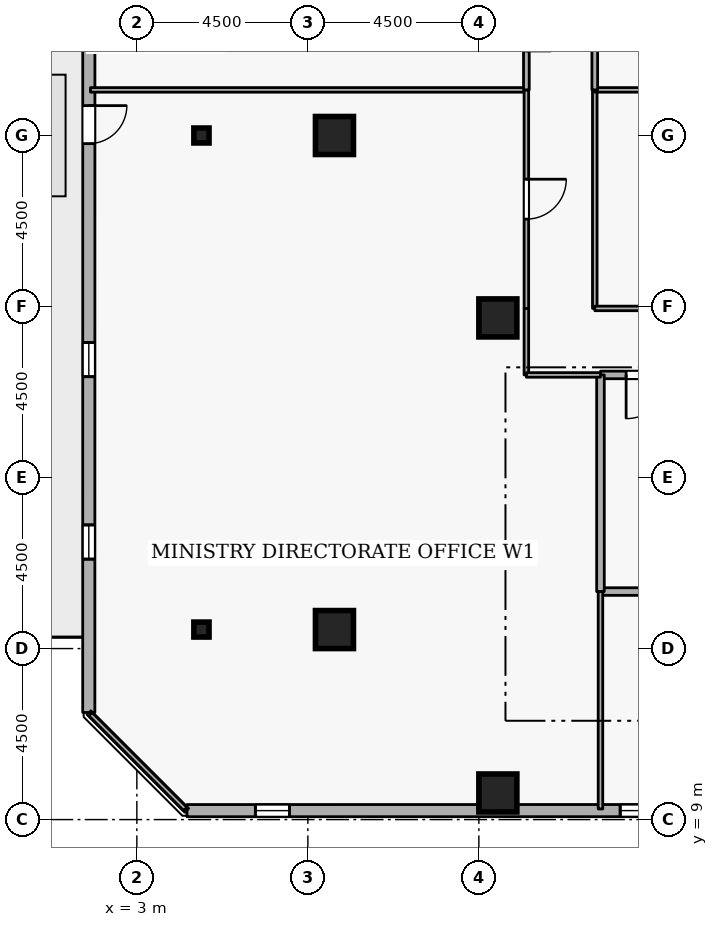
"""IFC4 building model, lengths in metres.
Left out: names, types, materials, properties, quantities, classifications, styles, units other than length and angle.
Written with IfcOpenShell. Run it as: python <this file> out.ifc"""

import sys

from ifc_helpers import new_model, si_unit, direction, frame, frame_2d, origin, origin_2d, place, context, subcontext, project, spatial, rectangle, i_section, extrude, element, fill, save


model = new_model("IFC4")
c1 = context("Model", 3, precision=1e-05, world=origin(), true_north=direction((0.0, 1.0)))
c2 = subcontext(c1, "Body", "Model", "MODEL_VIEW")
j1 = project(units=[si_unit("LENGTHUNIT", "METRE"), si_unit("PLANEANGLEUNIT", "RADIAN")], contexts=[c1])
p1 = place(None, origin())
s1 = spatial("IfcSite", under=j1, at=p1, CompositionType="ELEMENT")
p2 = place(p1, origin())
s2 = spatial("IfcBuilding", under=s1, at=p2, CompositionType="ELEMENT")
p3 = place(p2, frame((0.0, 0.0, 210.9)))
s3 = spatial("IfcBuildingStorey", under=s2, at=p3, CompositionType="ELEMENT", Elevation=210.9)
for number, where, z_axis, x_axis in (
    (1, (12.5, 9.7, 0.0), (0.0, 0.0, 1.0), (1.0, 0.0, 0.0)),
    (2, (8.2, 14.0, 0.0), (0.0, 0.0, 1.0), (1.0, 0.0, 0.0)),
    (3, (8.2, 27.0, 0.0), (0.0, 0.0, 1.0), (1.0, 0.0, 0.0)),
    (4, (12.5, 22.2, 0.0), (0.0, 0.0, 1.0), (1.0, 0.0, 0.0)),
):
    element("IfcColumn", number, at=place(p3, frame(where, z_axis=z_axis, x_axis=x_axis)), inside=s3, PredefinedType="COLUMN", context=c2, shape_type="SweptSolid", body=[
        extrude(rectangle(XDim=1.0, YDim=1.0, at=origin_2d()), origin(), (0.0, 0.0, 1.0), 3.6),
    ])
for number, where, z_axis, x_axis in (
    (5, (4.7, 14.0, 0.0), (0.0, 0.0, 1.0), (1.0, 0.0, 0.0)),
    (6, (4.7, 27.0, 0.0), (0.0, 0.0, 1.0), (1.0, 0.0, 0.0)),
):
    element("IfcColumn", number, at=place(p3, frame(where, z_axis=z_axis, x_axis=x_axis)), inside=s3, PredefinedType="COLUMN", context=c2, shape_type="SweptSolid", body=[
        extrude(i_section(OverallWidth=0.399, OverallDepth=0.394, WebThickness=0.023, FlangeThickness=0.037, FilletRadius=0.015, at=origin_2d()), origin(), (0.0, 0.0, 1.0), 3.6),
    ])
p4 = place(p3, frame((4.319, 9.235, 0.0), z_axis=(0.0, 0.0, 1.0), x_axis=(0.999999997144, 7.5574884e-05, 0.0)))
e7 = element("IfcWall", 7, at=p4, inside=s3, PredefinedType="STANDARD", context=c2, shape_type="SweptSolid", body=[
    extrude(rectangle(XDim=35.535, YDim=0.32, at=frame_2d((17.768, 0.0))), origin(), (0.0, 0.0, 1.0), 2.7),
])
p5 = place(p4, frame((1.8, 0.0, 0.72)))
e8 = element("IfcOpeningElement", 8, at=p5, cuts=e7, PredefinedType="OPENING", context=c2, shape_type="SweptSolid", body=[
    extrude(rectangle(XDim=0.9, YDim=1.75, at=frame_2d((0.45, 0.875))), frame((0.0, 0.17, 0.0), z_axis=(0.0, -1.0, 0.0), x_axis=(1.0, 0.0, 0.0)), (0.0, 0.0, 1.0), 0.34),
])
p6 = place(p4, frame((11.4, 0.0, 0.72)))
e9 = element("IfcOpeningElement", 9, at=p6, cuts=e7, PredefinedType="OPENING", context=c2, shape_type="SweptSolid", body=[
    extrude(rectangle(XDim=0.9, YDim=1.75, at=frame_2d((0.45, 0.875))), frame((0.0, 0.17, 0.0), z_axis=(0.0, -1.0, 0.0), x_axis=(1.0, 0.0, 0.0)), (0.0, 0.0, 1.0), 0.34),
])
p7 = place(p4, frame((16.2, 0.0, 0.72)))
e10 = element("IfcOpeningElement", 10, at=p7, cuts=e7, PredefinedType="OPENING", context=c2, shape_type="SweptSolid", body=[
    extrude(rectangle(XDim=0.9, YDim=1.75, at=frame_2d((0.45, 0.875))), frame((0.0, 0.17, 0.0), z_axis=(0.0, -1.0, 0.0), x_axis=(1.0, 0.0, 0.0)), (0.0, 0.0, 1.0), 0.34),
])
p8 = place(p4, frame((25.8, 0.0, 0.72)))
e11 = element("IfcOpeningElement", 11, at=p8, cuts=e7, PredefinedType="OPENING", context=c2, shape_type="SweptSolid", body=[
    extrude(rectangle(XDim=0.9, YDim=1.75, at=frame_2d((0.45, 0.875))), frame((0.0, 0.17, 0.0), z_axis=(0.0, -1.0, 0.0), x_axis=(1.0, 0.0, 0.0)), (0.0, 0.0, 1.0), 0.34),
])
p9 = place(p3, frame((1.738, 47.354, 0.0), z_axis=(0.0, 0.0, 1.0), x_axis=(-7.5574884e-05, -0.999999997144, 0.0)))
e12 = element("IfcWall", 12, at=p9, inside=s3, PredefinedType="STANDARD", context=c2, shape_type="SweptSolid", body=[
    extrude(rectangle(XDim=35.535, YDim=0.32, at=frame_2d((17.768, 0.0))), origin(), (0.0, 0.0, 1.0), 2.7),
])
p10 = place(p9, frame((19.567, 0.0, 0.0)))
e13 = element("IfcOpeningElement", 13, at=p10, cuts=e12, PredefinedType="OPENING", context=c2, shape_type="SweptSolid", body=[
    extrude(rectangle(XDim=1.0, YDim=2.08, at=frame_2d((0.5, 1.04))), frame((0.0, 0.17, 0.0), z_axis=(0.0, -1.0, 0.0), x_axis=(1.0, 0.0, 0.0)), (0.0, 0.0, 1.0), 0.34),
])
p11 = place(p9, frame((1.8, 0.0, 0.72)))
e14 = element("IfcOpeningElement", 14, at=p11, cuts=e12, PredefinedType="OPENING", context=c2, shape_type="SweptSolid", body=[
    extrude(rectangle(XDim=0.9, YDim=1.75, at=frame_2d((0.45, 0.875))), frame((0.0, 0.17, 0.0), z_axis=(0.0, -1.0, 0.0), x_axis=(1.0, 0.0, 0.0)), (0.0, 0.0, 1.0), 0.34),
])
p12 = place(p9, frame((6.6, 0.0, 0.72)))
e15 = element("IfcOpeningElement", 15, at=p12, cuts=e12, PredefinedType="OPENING", context=c2, shape_type="SweptSolid", body=[
    extrude(rectangle(XDim=0.9, YDim=1.75, at=frame_2d((0.45, 0.875))), frame((0.0, 0.17, 0.0), z_axis=(0.0, -1.0, 0.0), x_axis=(1.0, 0.0, 0.0)), (0.0, 0.0, 1.0), 0.34),
])
p13 = place(p9, frame((11.4, 0.0, 0.72)))
e16 = element("IfcOpeningElement", 16, at=p13, cuts=e12, PredefinedType="OPENING", context=c2, shape_type="SweptSolid", body=[
    extrude(rectangle(XDim=0.9, YDim=1.75, at=frame_2d((0.45, 0.875))), frame((0.0, 0.17, 0.0), z_axis=(0.0, -1.0, 0.0), x_axis=(1.0, 0.0, 0.0)), (0.0, 0.0, 1.0), 0.34),
])
p14 = place(p9, frame((16.2, 0.0, 0.72)))
e17 = element("IfcOpeningElement", 17, at=p14, cuts=e12, PredefinedType="OPENING", context=c2, shape_type="SweptSolid", body=[
    extrude(rectangle(XDim=0.9, YDim=1.75, at=frame_2d((0.45, 0.875))), frame((0.0, 0.17, 0.0), z_axis=(0.0, -1.0, 0.0), x_axis=(1.0, 0.0, 0.0)), (0.0, 0.0, 1.0), 0.34),
])
p15 = place(p9, frame((25.8, 0.0, 0.72)))
e18 = element("IfcOpeningElement", 18, at=p15, cuts=e12, PredefinedType="OPENING", context=c2, shape_type="SweptSolid", body=[
    extrude(rectangle(XDim=0.9, YDim=1.75, at=frame_2d((0.45, 0.875))), frame((0.0, 0.17, 0.0), z_axis=(0.0, -1.0, 0.0), x_axis=(1.0, 0.0, 0.0)), (0.0, 0.0, 1.0), 0.34),
])
p16 = place(p9, frame((30.6, 0.0, 0.72)))
e19 = element("IfcOpeningElement", 19, at=p16, cuts=e12, PredefinedType="OPENING", context=c2, shape_type="SweptSolid", body=[
    extrude(rectangle(XDim=0.9, YDim=1.75, at=frame_2d((0.45, 0.875))), frame((0.0, 0.17, 0.0), z_axis=(0.0, -1.0, 0.0), x_axis=(1.0, 0.0, 0.0)), (0.0, 0.0, 1.0), 0.34),
])
p17 = place(p3, frame((15.2, 15.0, 0.0), z_axis=(0.0, 0.0, 1.0), x_axis=(1.0, 0.0, 0.0)))
e20 = element("IfcWall", 20, at=p17, inside=s3, PredefinedType="STANDARD", context=c2, shape_type="SweptSolid", body=[
    extrude(rectangle(XDim=2.5, YDim=0.2, at=frame_2d((1.25, 0.0))), origin(), (0.0, 0.0, 1.0), 3.34),
])
p18 = place(p3, frame((17.7, 20.7, 0.0), z_axis=(0.0, 0.0, 1.0), x_axis=(-1.0, 0.0, 0.0)))
e21 = element("IfcWall", 21, at=p18, inside=s3, PredefinedType="STANDARD", context=c2, shape_type="SweptSolid", body=[
    extrude(rectangle(XDim=2.5, YDim=0.2, at=frame_2d((1.25, 0.0))), origin(), (0.0, 0.0, 1.0), 3.34),
])
p19 = place(p18, frame((0.675, 0.0, 0.0)))
e22 = element("IfcOpeningElement", 22, at=p19, cuts=e21, PredefinedType="OPENING", context=c2, shape_type="SweptSolid", body=[
    extrude(rectangle(XDim=1.15, YDim=2.1, at=frame_2d((0.575, 1.05))), frame((0.0, 0.11, 0.0), z_axis=(0.0, -1.0, 0.0), x_axis=(1.0, 0.0, 0.0)), (0.0, 0.0, 1.0), 0.22),
])
p20 = place(p3, frame((15.2, 20.7, 0.0), z_axis=(0.0, 0.0, 1.0), x_axis=(0.0, -1.0, 0.0)))
e23 = element("IfcWall", 23, at=p20, inside=s3, PredefinedType="STANDARD", context=c2, shape_type="SweptSolid", body=[
    extrude(rectangle(XDim=5.7, YDim=0.2, at=frame_2d((2.85, 0.0))), origin(), (0.0, 0.0, 1.0), 3.34),
])
p21 = place(p3, frame((1.78, 28.2, 0.0), z_axis=(0.0, 0.0, 1.0), x_axis=(1.0, 0.0, 0.0)))
e24 = element("IfcWall", 24, at=p21, inside=s3, PredefinedType="PARTITIONING", context=c2, shape_type="SweptSolid", body=[
    extrude(rectangle(XDim=11.47, YDim=0.12, at=frame_2d((5.735, 0.0))), origin(), (0.0, 0.0, 1.0), 3.34),
])
p22 = place(p3, frame((13.25, 28.2, 0.0), z_axis=(0.0, 0.0, 1.0), x_axis=(0.0, -1.0, 0.0)))
e25 = element("IfcWall", 25, at=p22, inside=s3, PredefinedType="PARTITIONING", context=c2, shape_type="SweptSolid", body=[
    extrude(rectangle(XDim=5.75, YDim=0.12, at=frame_2d((2.875, 0.0))), origin(), (0.0, 0.0, 1.0), 3.34),
])
p23 = place(p22, frame((2.35, 0.0, 0.0)))
e26 = element("IfcOpeningElement", 26, at=p23, cuts=e25, PredefinedType="OPENING", context=c2, shape_type="SweptSolid", body=[
    extrude(rectangle(XDim=1.05, YDim=2.1, at=frame_2d((0.525, 1.05))), frame((0.0, 0.07, 0.0), z_axis=(0.0, -1.0, 0.0), x_axis=(1.0, 0.0, 0.0)), (0.0, 0.0, 1.0), 0.14),
])
p24 = place(p3, frame((13.25, 22.45, 0.0), z_axis=(0.0, 0.0, 1.0), x_axis=(0.0, -1.0, 0.0)))
e27 = element("IfcWall", 27, at=p24, inside=s3, PredefinedType="PARTITIONING", context=c2, shape_type="SweptSolid", body=[
    extrude(rectangle(XDim=1.75, YDim=0.12, at=frame_2d((0.875, 0.0))), origin(), (0.0, 0.0, 1.0), 3.34),
])
p25 = place(p3, frame((13.25, 20.7, 0.0), z_axis=(0.0, 0.0, 1.0), x_axis=(1.0, 0.0, 0.0)))
e28 = element("IfcWall", 28, at=p25, inside=s3, PredefinedType="PARTITIONING", context=c2, shape_type="SweptSolid", body=[
    extrude(rectangle(XDim=1.95, YDim=0.12, at=frame_2d((0.975, 0.0))), origin(), (0.0, 0.0, 1.0), 3.34),
])
p26 = place(p3, frame((15.2, 15.0, 0.0), z_axis=(0.0, 0.0, 1.0), x_axis=(0.0, -1.0, 0.0)))
e29 = element("IfcWall", 29, at=p26, inside=s3, PredefinedType="PARTITIONING", context=c2, shape_type="SweptSolid", body=[
    extrude(rectangle(XDim=5.72, YDim=0.12, at=frame_2d((2.86, 0.0))), origin(), (0.0, 0.0, 1.0), 3.34),
])
p27 = place(p3, frame((4.275, 9.28, 0.0), z_axis=(0.0, 0.0, 1.0), x_axis=(-0.707106781187, 0.707106781187, 0.0)))
e30 = element("IfcWall", 30, at=p27, inside=s3, PredefinedType="PARTITIONING", context=c2, shape_type="SweptSolid", body=[
    extrude(rectangle(XDim=3.528, YDim=0.12, at=frame_2d((1.764, 0.0))), origin(), (0.0, 0.0, 1.0), 3.34),
])
p28 = place(p3, frame((13.25, 31.55, 0.0), z_axis=(0.0, 0.0, 1.0), x_axis=(0.0, -1.0, 0.0)))
e31 = element("IfcWall", 31, at=p28, inside=s3, PredefinedType="PARTITIONING", context=c2, shape_type="SweptSolid", body=[
    extrude(rectangle(XDim=3.35, YDim=0.15, at=frame_2d((1.675, 0.0))), origin(), (0.0, 0.0, 1.0), 3.34),
])
p29 = place(p28, frame((1.025, 0.0, 0.0)))
e32 = element("IfcOpeningElement", 32, at=p29, cuts=e31, PredefinedType="OPENING", context=c2, shape_type="SweptSolid", body=[
    extrude(rectangle(XDim=1.3, YDim=2.12, at=frame_2d((0.65, 1.06))), frame((0.0, 0.085, 0.0), z_axis=(0.0, -1.0, 0.0), x_axis=(1.0, 0.0, 0.0)), (0.0, 0.0, 1.0), 0.17),
])
p30 = place(p3, frame((15.05, 22.45, 0.0), z_axis=(0.0, 0.0, 1.0), x_axis=(0.0, 1.0, 0.0)))
e33 = element("IfcWall", 33, at=p30, inside=s3, PredefinedType="PARTITIONING", context=c2, shape_type="SweptSolid", body=[
    extrude(rectangle(XDim=5.75, YDim=0.12, at=frame_2d((2.875, 0.0))), origin(), (0.0, 0.0, 1.0), 3.34),
])
p31 = place(p3, frame((15.05, 28.2, 0.0), z_axis=(0.0, 0.0, 1.0), x_axis=(1.0, 0.0, 0.0)))
e34 = element("IfcWall", 34, at=p31, inside=s3, PredefinedType="PARTITIONING", context=c2, shape_type="SweptSolid", body=[
    extrude(rectangle(XDim=5.85, YDim=0.12, at=frame_2d((2.925, 0.0))), origin(), (0.0, 0.0, 1.0), 3.34),
])
p32 = place(p3, frame((20.9, 22.45, 0.0), z_axis=(0.0, 0.0, 1.0), x_axis=(-1.0, 0.0, 0.0)))
e35 = element("IfcWall", 35, at=p32, inside=s3, PredefinedType="PARTITIONING", context=c2, shape_type="SweptSolid", body=[
    extrude(rectangle(XDim=5.85, YDim=0.12, at=frame_2d((2.925, 0.0))), origin(), (0.0, 0.0, 1.0), 3.34),
])
p33 = place(p32, frame((2.45, 0.0, 0.0)))
e36 = element("IfcOpeningElement", 36, at=p33, cuts=e35, PredefinedType="OPENING", context=c2, shape_type="SweptSolid", body=[
    extrude(rectangle(XDim=0.95, YDim=2.1, at=frame_2d((0.475, 1.05))), frame((0.0, 0.07, 0.0), z_axis=(0.0, -1.0, 0.0), x_axis=(1.0, 0.0, 0.0)), (0.0, 0.0, 1.0), 0.14),
])
p34 = place(p3, frame((15.05, 28.2, 0.0), z_axis=(0.0, 0.0, 1.0), x_axis=(0.0, 1.0, 0.0)))
e37 = element("IfcWall", 37, at=p34, inside=s3, PredefinedType="PARTITIONING", context=c2, shape_type="SweptSolid", body=[
    extrude(rectangle(XDim=3.35, YDim=0.15, at=frame_2d((1.675, 0.0))), origin(), (0.0, 0.0, 1.0), 3.34),
])
p35 = place(p5, origin())
e38 = element("IfcWindow", 38, at=p35, inside=s3, PartitioningType="SINGLE_PANEL", PredefinedType="WINDOW", context=c2, shape_type="SweptSolid", body=[
    extrude(rectangle(XDim=0.9, YDim=1.75, at=frame_2d((0.45, 0.875))), frame((0.0, 0.03, 0.0), z_axis=(0.0, -1.0, 0.0), x_axis=(1.0, 0.0, 0.0)), (0.0, 0.0, 1.0), 0.06),
])
fill(e8, e38)
p36 = place(p6, origin())
e39 = element("IfcWindow", 39, at=p36, inside=s3, PartitioningType="SINGLE_PANEL", PredefinedType="WINDOW", context=c2, shape_type="SweptSolid", body=[
    extrude(rectangle(XDim=0.9, YDim=1.75, at=frame_2d((0.45, 0.875))), frame((0.0, 0.03, 0.0), z_axis=(0.0, -1.0, 0.0), x_axis=(1.0, 0.0, 0.0)), (0.0, 0.0, 1.0), 0.06),
])
fill(e9, e39)
p37 = place(p10, origin())
e40 = element("IfcDoor", 40, at=p37, inside=s3, OperationType="SINGLE_SWING_LEFT", PredefinedType="DOOR", context=c2, shape_type="SweptSolid", body=[
    extrude(rectangle(XDim=1.0, YDim=2.08, at=frame_2d((0.5, 1.04))), frame((0.0, 0.025, 0.0), z_axis=(0.0, -1.0, 0.0), x_axis=(1.0, 0.0, 0.0)), (0.0, 0.0, 1.0), 0.05),
])
fill(e13, e40)
p38 = place(p15, origin())
e41 = element("IfcWindow", 41, at=p38, inside=s3, PartitioningType="SINGLE_PANEL", PredefinedType="WINDOW", context=c2, shape_type="SweptSolid", body=[
    extrude(rectangle(XDim=0.9, YDim=1.75, at=frame_2d((0.45, 0.875))), frame((0.0, 0.03, 0.0), z_axis=(0.0, -1.0, 0.0), x_axis=(1.0, 0.0, 0.0)), (0.0, 0.0, 1.0), 0.06),
])
fill(e18, e41)
p39 = place(p16, origin())
e42 = element("IfcWindow", 42, at=p39, inside=s3, PartitioningType="SINGLE_PANEL", PredefinedType="WINDOW", context=c2, shape_type="SweptSolid", body=[
    extrude(rectangle(XDim=0.9, YDim=1.75, at=frame_2d((0.45, 0.875))), frame((0.0, 0.03, 0.0), z_axis=(0.0, -1.0, 0.0), x_axis=(1.0, 0.0, 0.0)), (0.0, 0.0, 1.0), 0.06),
])
fill(e19, e42)
p40 = place(p19, origin())
e43 = element("IfcDoor", 43, at=p40, inside=s3, OperationType="SINGLE_SWING_RIGHT", PredefinedType="DOOR", context=c2, shape_type="SweptSolid", body=[
    extrude(rectangle(XDim=1.15, YDim=2.1, at=frame_2d((0.575, 1.05))), frame((0.0, 0.025, 0.0), z_axis=(0.0, -1.0, 0.0), x_axis=(1.0, 0.0, 0.0)), (0.0, 0.0, 1.0), 0.05),
])
fill(e22, e43)
p41 = place(p23, origin())
e44 = element("IfcDoor", 44, at=p41, inside=s3, OperationType="SINGLE_SWING_LEFT", PredefinedType="DOOR", context=c2, shape_type="SweptSolid", body=[
    extrude(rectangle(XDim=1.05, YDim=2.1, at=frame_2d((0.525, 1.05))), frame((0.0, 0.025, 0.0), z_axis=(0.0, -1.0, 0.0), x_axis=(1.0, 0.0, 0.0)), (0.0, 0.0, 1.0), 0.05),
])
fill(e26, e44)
save(model, sys.argv[1])
